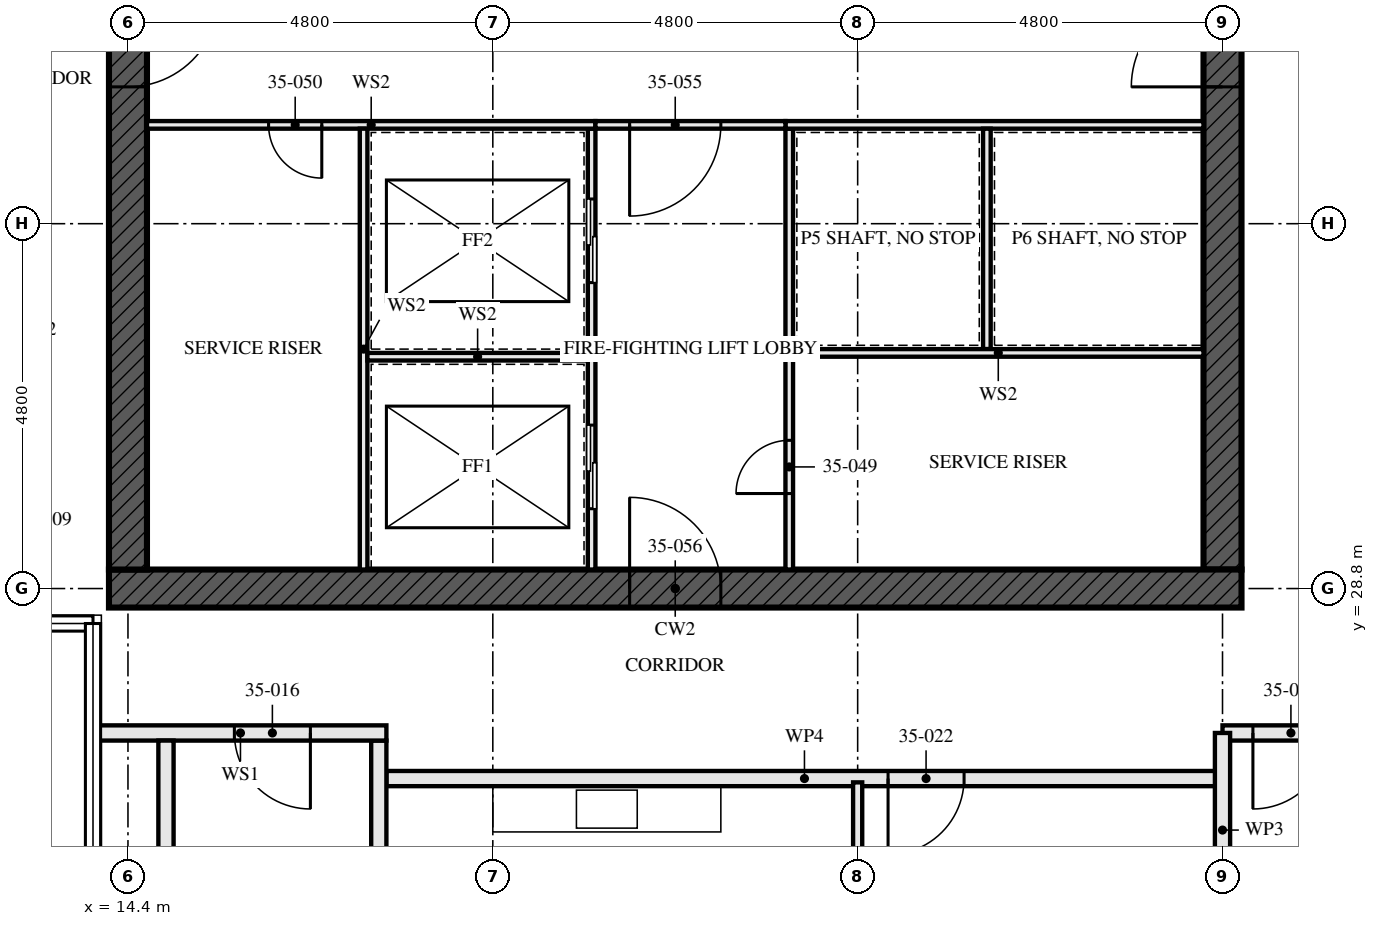
"""IFC4 building model, lengths in metres.
Left out: names, types, materials, properties, quantities, classifications, styles, units other than length and angle.
Written with IfcOpenShell. Run it as: python <this file> out.ifc"""

import sys

from ifc_helpers import new_model, si_unit, direction, frame, frame_2d, origin, place, context, subcontext, project, spatial, rectangle, extrude, element, fill, save


model = new_model("IFC4")
c1 = context("Model", 3, precision=1e-05, world=origin(), true_north=direction((0.0, 1.0)))
c2 = subcontext(c1, "Body", "Model", "MODEL_VIEW")
j1 = project(units=[si_unit("LENGTHUNIT", "METRE"), si_unit("PLANEANGLEUNIT", "RADIAN")], contexts=[c1])
p1 = place(None, origin())
s1 = spatial("IfcSite", under=j1, at=p1, CompositionType="ELEMENT")
p2 = place(p1, origin())
s2 = spatial("IfcBuilding", under=s1, at=p2, CompositionType="ELEMENT")
p3 = place(p2, frame((0.0, 0.0, 129.5)))
s3 = spatial("IfcBuildingStorey", under=s2, at=p3, CompositionType="ELEMENT", Elevation=129.5)
p4 = place(p3, frame((14.15, 28.8, -0.17), z_axis=(0.0, 0.0, 1.0), x_axis=(1.0, 0.0, 0.0)))
e1 = element("IfcWall", 1, at=p4, inside=s3, PredefinedType="SHEAR", context=c2, shape_type="SweptSolid", body=[
    extrude(rectangle(XDim=14.9, YDim=0.5, at=frame_2d((7.45, 0.0))), origin(), (0.0, 0.0, 1.0), 3.5),
])
p5 = place(p4, frame((6.85, 0.0, 0.17)))
e2 = element("IfcOpeningElement", 2, at=p5, cuts=e1, PredefinedType="OPENING", context=c2, shape_type="SweptSolid", body=[
    extrude(rectangle(XDim=1.2, YDim=2.1, at=frame_2d((0.6, 1.05))), frame((0.0, 0.26, 0.0), z_axis=(0.0, -1.0, 0.0), x_axis=(1.0, 0.0, 0.0)), (0.0, 0.0, 1.0), 0.521),
])
p6 = place(p3, frame((14.4, 42.95, -0.17), z_axis=(0.0, 0.0, 1.0), x_axis=(0.0, -1.0, 0.0)))
e3 = element("IfcWall", 3, at=p6, inside=s3, PredefinedType="SHEAR", context=c2, shape_type="SweptSolid", body=[
    extrude(rectangle(XDim=13.9, YDim=0.5, at=frame_2d((6.95, 0.0))), origin(), (0.0, 0.0, 1.0), 3.5),
])
p7 = place(p6, frame((6.35, 0.0, 0.17)))
e4 = element("IfcOpeningElement", 4, at=p7, cuts=e3, PredefinedType="OPENING", context=c2, shape_type="SweptSolid", body=[
    extrude(rectangle(XDim=1.2, YDim=2.1, at=frame_2d((0.6, 1.05))), frame((0.0, 0.26, 0.0), z_axis=(0.0, -1.0, 0.0), x_axis=(1.0, 0.0, 0.0)), (0.0, 0.0, 1.0), 0.521),
])
p8 = place(p3, frame((28.8, 29.05, -0.17), z_axis=(0.0, 0.0, 1.0), x_axis=(0.0, 1.0, 0.0)))
e5 = element("IfcWall", 5, at=p8, inside=s3, PredefinedType="SHEAR", context=c2, shape_type="SweptSolid", body=[
    extrude(rectangle(XDim=13.9, YDim=0.5, at=frame_2d((6.95, 0.0))), origin(), (0.0, 0.0, 1.0), 3.5),
])
p9 = place(p8, frame((6.35, 0.0, 0.17)))
e6 = element("IfcOpeningElement", 6, at=p9, cuts=e5, PredefinedType="OPENING", context=c2, shape_type="SweptSolid", body=[
    extrude(rectangle(XDim=1.2, YDim=2.1, at=frame_2d((0.6, 1.05))), frame((0.0, 0.26, 0.0), z_axis=(0.0, -1.0, 0.0), x_axis=(1.0, 0.0, 0.0)), (0.0, 0.0, 1.0), 0.521),
])
for number, where, z_axis, x_axis in (
    (7, (14.9, 22.1, 0.0), (0.0, 0.0, 1.0), (0.0, 1.0, 0.0)),
    (8, (17.7, 22.1, 0.0), (0.0, 0.0, 1.0), (0.0, 1.0, 0.0)),
):
    element("IfcWall", number, at=place(p3, frame(where, z_axis=z_axis, x_axis=x_axis)), inside=s3, PredefinedType="SOLIDWALL", context=c2, shape_type="SweptSolid", body=[
        extrude(rectangle(XDim=4.7, YDim=0.2, at=frame_2d((2.35, 0.0))), origin(), (0.0, 0.0, 1.0), 2.99),
    ])
p10 = place(p3, frame((13.96, 26.9, 0.0), z_axis=(0.0, 0.0, 1.0), x_axis=(1.0, 0.0, 0.0)))
e9 = element("IfcWall", 9, at=p10, inside=s3, PredefinedType="SOLIDWALL", context=c2, shape_type="SweptSolid", body=[
    extrude(rectangle(XDim=3.84, YDim=0.2, at=frame_2d((1.92, 0.0))), origin(), (0.0, 0.0, 1.0), 2.32),
])
p11 = place(p10, frame((1.84, 0.0, 0.0)))
e10 = element("IfcOpeningElement", 10, at=p11, cuts=e9, PredefinedType="OPENING", context=c2, shape_type="SweptSolid", body=[
    extrude(rectangle(XDim=1.0, YDim=2.1, at=frame_2d((0.5, 1.05))), frame((0.0, 0.111, 0.0), z_axis=(0.0, -1.0, 0.0), x_axis=(1.0, 0.0, 0.0)), (0.0, 0.0, 1.0), 0.221),
])
p12 = place(p3, frame((24.0, 20.1, 0.0), z_axis=(0.0, 0.0, 1.0), x_axis=(0.0, 1.0, 0.0)))
e11 = element("IfcWall", 11, at=p12, inside=s3, PredefinedType="PARTITIONING", context=c2, shape_type="SweptSolid", body=[
    extrude(rectangle(XDim=6.15, YDim=0.12, at=frame_2d((3.075, 0.0))), origin(), (0.0, 0.0, 1.0), 2.55),
])
p13 = place(p12, frame((2.625, 0.0, 0.0)))
e12 = element("IfcOpeningElement", 12, at=p13, cuts=e11, PredefinedType="OPENING", context=c2, shape_type="SweptSolid", body=[
    extrude(rectangle(XDim=0.9, YDim=2.1, at=frame_2d((0.45, 1.05))), frame((0.0, 0.071, 0.0), z_axis=(0.0, -1.0, 0.0), x_axis=(1.0, 0.0, 0.0)), (0.0, 0.0, 1.0), 0.141),
])
p14 = place(p3, frame((17.8, 26.3, 0.0), z_axis=(0.0, 0.0, 1.0), x_axis=(1.0, 0.0, 0.0)))
e13 = element("IfcWall", 13, at=p14, inside=s3, PredefinedType="PARTITIONING", context=c2, shape_type="SweptSolid", body=[
    extrude(rectangle(XDim=11.0, YDim=0.2, at=frame_2d((5.5, 0.0))), origin(), (0.0, 0.0, 1.0), 2.55),
])
p15 = place(p14, frame((6.6, 0.0, 0.0)))
e14 = element("IfcOpeningElement", 14, at=p15, cuts=e13, PredefinedType="OPENING", context=c2, shape_type="SweptSolid", body=[
    extrude(rectangle(XDim=1.0, YDim=2.1, at=frame_2d((0.5, 1.05))), frame((0.0, 0.111, 0.0), z_axis=(0.0, -1.0, 0.0), x_axis=(1.0, 0.0, 0.0)), (0.0, 0.0, 1.0), 0.221),
])
p16 = place(p3, frame((28.8, 26.9, 0.0), z_axis=(0.0, 0.0, 1.0), x_axis=(1.0, 0.0, 0.0)))
e15 = element("IfcWall", 15, at=p16, inside=s3, PredefinedType="PARTITIONING", context=c2, shape_type="SweptSolid", body=[
    extrude(rectangle(XDim=9.6, YDim=0.2, at=frame_2d((4.8, 0.0))), origin(), (0.0, 0.0, 1.0), 3.33),
])
p17 = place(p16, frame((0.4, 0.0, 0.0)))
e16 = element("IfcOpeningElement", 16, at=p17, cuts=e15, PredefinedType="OPENING", context=c2, shape_type="SweptSolid", body=[
    extrude(rectangle(XDim=1.0, YDim=2.1, at=frame_2d((0.5, 1.05))), frame((0.0, 0.111, 0.0), z_axis=(0.0, -1.0, 0.0), x_axis=(1.0, 0.0, 0.0)), (0.0, 0.0, 1.0), 0.221),
])
p18 = place(p3, frame((20.5, 29.05, 0.0), z_axis=(0.0, 0.0, 1.0), x_axis=(0.0, 1.0, 0.0)))
e17 = element("IfcWall", 17, at=p18, inside=s3, PredefinedType="SOLIDWALL", context=c2, shape_type="SweptSolid", body=[
    extrude(rectangle(XDim=5.8, YDim=0.1, at=frame_2d((2.9, 0.0))), origin(), (0.0, 0.0, 1.0), 3.33),
])
p19 = place(p18, frame((0.8, 0.0, 0.0)))
e18 = element("IfcOpeningElement", 18, at=p19, cuts=e17, PredefinedType="OPENING", context=c2, shape_type="SweptSolid", body=[
    extrude(rectangle(XDim=1.1, YDim=2.3, at=frame_2d((0.55, 1.15))), frame((0.0, 0.061, 0.0), z_axis=(0.0, -1.0, 0.0), x_axis=(1.0, 0.0, 0.0)), (0.0, 0.0, 1.0), 0.121),
])
p20 = place(p18, frame((3.775, 0.0, 0.0)))
e19 = element("IfcOpeningElement", 19, at=p20, cuts=e17, PredefinedType="OPENING", context=c2, shape_type="SweptSolid", body=[
    extrude(rectangle(XDim=1.1, YDim=2.3, at=frame_2d((0.55, 1.15))), frame((0.0, 0.061, 0.0), z_axis=(0.0, -1.0, 0.0), x_axis=(1.0, 0.0, 0.0)), (0.0, 0.0, 1.0), 0.121),
])
p21 = place(p3, frame((23.1, 29.05, 0.0), z_axis=(0.0, 0.0, 1.0), x_axis=(0.0, 1.0, 0.0)))
e20 = element("IfcWall", 20, at=p21, inside=s3, PredefinedType="SOLIDWALL", context=c2, shape_type="SweptSolid", body=[
    extrude(rectangle(XDim=5.8, YDim=0.1, at=frame_2d((2.9, 0.0))), origin(), (0.0, 0.0, 1.0), 3.33),
])
p22 = place(p21, frame((1.0, 0.0, 0.0)))
e21 = element("IfcOpeningElement", 21, at=p22, cuts=e20, PredefinedType="OPENING", context=c2, shape_type="SweptSolid", body=[
    extrude(rectangle(XDim=0.7, YDim=2.1, at=frame_2d((0.35, 1.05))), frame((0.0, 0.061, 0.0), z_axis=(0.0, -1.0, 0.0), x_axis=(1.0, 0.0, 0.0)), (0.0, 0.0, 1.0), 0.121),
])
p23 = place(p3, frame((14.65, 34.9, 0.0), z_axis=(0.0, 0.0, 1.0), x_axis=(1.0, 0.0, 0.0)))
e22 = element("IfcWall", 22, at=p23, inside=s3, PredefinedType="SOLIDWALL", context=c2, shape_type="SweptSolid", body=[
    extrude(rectangle(XDim=5.9, YDim=0.1, at=frame_2d((2.95, 0.0))), origin(), (0.0, 0.0, 1.0), 3.33),
])
p24 = place(p23, frame((1.6, 0.0, 0.0)))
e23 = element("IfcOpeningElement", 23, at=p24, cuts=e22, PredefinedType="OPENING", context=c2, shape_type="SweptSolid", body=[
    extrude(rectangle(XDim=0.7, YDim=2.1, at=frame_2d((0.35, 1.05))), frame((0.0, 0.061, 0.0), z_axis=(0.0, -1.0, 0.0), x_axis=(1.0, 0.0, 0.0)), (0.0, 0.0, 1.0), 0.121),
])
p25 = place(p3, frame((23.05, 34.9, 0.0), z_axis=(0.0, 0.0, 1.0), x_axis=(1.0, 0.0, 0.0)))
e24 = element("IfcWall", 24, at=p25, inside=s3, PredefinedType="SOLIDWALL", context=c2, shape_type="SweptSolid", body=[
    extrude(rectangle(XDim=5.5, YDim=0.1, at=frame_2d((2.75, 0.0))), origin(), (0.0, 0.0, 1.0), 3.33),
])
p26 = place(p3, frame((20.55, 34.9, 0.0), z_axis=(0.0, 0.0, 1.0), x_axis=(1.0, 0.0, 0.0)))
e25 = element("IfcWall", 25, at=p26, inside=s3, PredefinedType="SOLIDWALL", context=c2, shape_type="SweptSolid", body=[
    extrude(rectangle(XDim=2.5, YDim=0.1, at=frame_2d((1.25, 0.0))), origin(), (0.0, 0.0, 1.0), 3.33),
])
p27 = place(p26, frame((0.45, 0.0, 0.0)))
e26 = element("IfcOpeningElement", 26, at=p27, cuts=e25, PredefinedType="OPENING", context=c2, shape_type="SweptSolid", body=[
    extrude(rectangle(XDim=1.2, YDim=2.1, at=frame_2d((0.6, 1.05))), frame((0.0, 0.061, 0.0), z_axis=(0.0, -1.0, 0.0), x_axis=(1.0, 0.0, 0.0)), (0.0, 0.0, 1.0), 0.121),
])
p28 = place(p3, frame((17.5, 29.05, 0.0), z_axis=(0.0, 0.0, 1.0), x_axis=(0.0, 1.0, 0.0)))
e27 = element("IfcWall", 27, at=p28, inside=s3, PredefinedType="SOLIDWALL", context=c2, shape_type="SweptSolid", body=[
    extrude(rectangle(XDim=5.8, YDim=0.1, at=frame_2d((2.9, 0.0))), origin(), (0.0, 0.0, 1.0), 3.33),
])
p29 = place(p3, frame((17.55, 31.85, 0.0), z_axis=(0.0, 0.0, 1.0), x_axis=(1.0, 0.0, 0.0)))
e28 = element("IfcWall", 28, at=p29, inside=s3, PredefinedType="SOLIDWALL", context=c2, shape_type="SweptSolid", body=[
    extrude(rectangle(XDim=2.9, YDim=0.1, at=frame_2d((1.45, 0.0))), origin(), (0.0, 0.0, 1.0), 3.33),
])
p30 = place(p3, frame((25.7, 31.95, 0.0), z_axis=(0.0, 0.0, 1.0), x_axis=(0.0, 1.0, 0.0)))
e29 = element("IfcWall", 29, at=p30, inside=s3, PredefinedType="SOLIDWALL", context=c2, shape_type="SweptSolid", body=[
    extrude(rectangle(XDim=2.9, YDim=0.1, at=frame_2d((1.45, 0.0))), origin(), (0.0, 0.0, 1.0), 3.33),
])
p31 = place(p3, frame((23.15, 31.9, 0.0), z_axis=(0.0, 0.0, 1.0), x_axis=(1.0, 0.0, 0.0)))
e30 = element("IfcWall", 30, at=p31, inside=s3, PredefinedType="SOLIDWALL", context=c2, shape_type="SweptSolid", body=[
    extrude(rectangle(XDim=5.4, YDim=0.1, at=frame_2d((2.7, 0.0))), origin(), (0.0, 0.0, 1.0), 3.33),
])
p32 = place(p3, frame((28.8, 24.345, 0.0), z_axis=(0.0, 0.0, 1.0), x_axis=(0.0, 1.0, 0.0)))
e31 = element("IfcWall", 31, at=p32, inside=s3, PredefinedType="PARTITIONING", context=c2, shape_type="SweptSolid", body=[
    extrude(rectangle(XDim=2.555, YDim=0.2, at=frame_2d((1.277, 0.0))), origin(), (0.0, 0.0, 1.0), 2.32),
])
p33 = place(p11, frame((1.0, 0.0, 0.0), z_axis=(0.0, 0.0, 1.0), x_axis=(-1.0, 0.0, 0.0)))
e32 = element("IfcDoor", 32, at=p33, inside=s3, OperationType="SINGLE_SWING_RIGHT", PredefinedType="DOOR", context=c2, shape_type="SweptSolid", body=[
    extrude(rectangle(XDim=1.0, YDim=2.1, at=frame_2d((0.5, 1.05))), frame((0.0, 0.032, 0.0), z_axis=(0.0, -1.0, 0.0), x_axis=(1.0, 0.0, 0.0)), (0.0, 0.0, 1.0), 0.064),
])
fill(e10, e32)
p34 = place(p15, frame((1.0, 0.0, 0.0), z_axis=(0.0, 0.0, 1.0), x_axis=(-1.0, 0.0, 0.0)))
e33 = element("IfcDoor", 33, at=p34, inside=s3, OperationType="SINGLE_SWING_LEFT", PredefinedType="DOOR", context=c2, shape_type="SweptSolid", body=[
    extrude(rectangle(XDim=1.0, YDim=2.1, at=frame_2d((0.5, 1.05))), frame((0.0, 0.027, 0.0), z_axis=(0.0, -1.0, 0.0), x_axis=(1.0, 0.0, 0.0)), (0.0, 0.0, 1.0), 0.054),
])
fill(e14, e33)
p35 = place(p17, frame((1.0, 0.0, 0.0), z_axis=(0.0, 0.0, 1.0), x_axis=(-1.0, 0.0, 0.0)))
e34 = element("IfcDoor", 34, at=p35, inside=s3, OperationType="SINGLE_SWING_LEFT", PredefinedType="DOOR", context=c2, shape_type="SweptSolid", body=[
    extrude(rectangle(XDim=1.0, YDim=2.1, at=frame_2d((0.5, 1.05))), frame((0.0, 0.027, 0.0), z_axis=(0.0, -1.0, 0.0), x_axis=(1.0, 0.0, 0.0)), (0.0, 0.0, 1.0), 0.054),
])
fill(e16, e34)
p36 = place(p19, origin())
e35 = element("IfcDoor", 35, at=p36, inside=s3, OperationType="SLIDING_TO_LEFT", PredefinedType="DOOR", context=c2, shape_type="SweptSolid", body=[
    extrude(rectangle(XDim=1.1, YDim=2.3, at=frame_2d((0.55, 1.15))), frame((0.0, 0.05, 0.0), z_axis=(0.0, -1.0, 0.0), x_axis=(1.0, 0.0, 0.0)), (0.0, 0.0, 1.0), 0.1),
])
fill(e18, e35)
p37 = place(p20, origin())
e36 = element("IfcDoor", 36, at=p37, inside=s3, OperationType="SLIDING_TO_LEFT", PredefinedType="DOOR", context=c2, shape_type="SweptSolid", body=[
    extrude(rectangle(XDim=1.1, YDim=2.3, at=frame_2d((0.55, 1.15))), frame((0.0, 0.05, 0.0), z_axis=(0.0, -1.0, 0.0), x_axis=(1.0, 0.0, 0.0)), (0.0, 0.0, 1.0), 0.1),
])
fill(e19, e36)
p38 = place(p22, origin())
e37 = element("IfcDoor", 37, at=p38, inside=s3, OperationType="SINGLE_SWING_RIGHT", PredefinedType="DOOR", context=c2, shape_type="SweptSolid", body=[
    extrude(rectangle(XDim=0.7, YDim=2.1, at=frame_2d((0.35, 1.05))), frame((0.0, 0.027, 0.0), z_axis=(0.0, -1.0, 0.0), x_axis=(1.0, 0.0, 0.0)), (0.0, 0.0, 1.0), 0.054),
])
fill(e21, e37)
p39 = place(p24, frame((0.7, 0.0, 0.0), z_axis=(0.0, 0.0, 1.0), x_axis=(-1.0, 0.0, 0.0)))
e38 = element("IfcDoor", 38, at=p39, inside=s3, OperationType="SINGLE_SWING_RIGHT", PredefinedType="DOOR", context=c2, shape_type="SweptSolid", body=[
    extrude(rectangle(XDim=0.7, YDim=2.1, at=frame_2d((0.35, 1.05))), frame((0.0, 0.027, 0.0), z_axis=(0.0, -1.0, 0.0), x_axis=(1.0, 0.0, 0.0)), (0.0, 0.0, 1.0), 0.054),
])
fill(e23, e38)
p40 = place(p27, frame((1.2, 0.0, 0.0), z_axis=(0.0, 0.0, 1.0), x_axis=(-1.0, 0.0, 0.0)))
e39 = element("IfcDoor", 39, at=p40, inside=s3, OperationType="SINGLE_SWING_LEFT", PredefinedType="DOOR", context=c2, shape_type="SweptSolid", body=[
    extrude(rectangle(XDim=1.2, YDim=2.1, at=frame_2d((0.6, 1.05))), frame((0.0, 0.027, 0.0), z_axis=(0.0, -1.0, 0.0), x_axis=(1.0, 0.0, 0.0)), (0.0, 0.0, 1.0), 0.054),
])
fill(e26, e39)
p41 = place(p5, origin())
e40 = element("IfcDoor", 40, at=p41, inside=s3, OperationType="SINGLE_SWING_LEFT", PredefinedType="DOOR", context=c2, shape_type="SweptSolid", body=[
    extrude(rectangle(XDim=1.2, YDim=2.1, at=frame_2d((0.6, 1.05))), frame((0.0, 0.027, 0.0), z_axis=(0.0, -1.0, 0.0), x_axis=(1.0, 0.0, 0.0)), (0.0, 0.0, 1.0), 0.054),
])
fill(e2, e40)
p42 = place(p7, origin())
e41 = element("IfcDoor", 41, at=p42, inside=s3, OperationType="SINGLE_SWING_LEFT", PredefinedType="DOOR", context=c2, shape_type="SweptSolid", body=[
    extrude(rectangle(XDim=1.2, YDim=2.1, at=frame_2d((0.6, 1.05))), frame((0.0, 0.027, 0.0), z_axis=(0.0, -1.0, 0.0), x_axis=(1.0, 0.0, 0.0)), (0.0, 0.0, 1.0), 0.054),
])
fill(e4, e41)
p43 = place(p9, origin())
e42 = element("IfcDoor", 42, at=p43, inside=s3, OperationType="SINGLE_SWING_LEFT", PredefinedType="DOOR", context=c2, shape_type="SweptSolid", body=[
    extrude(rectangle(XDim=1.2, YDim=2.1, at=frame_2d((0.6, 1.05))), frame((0.0, 0.027, 0.0), z_axis=(0.0, -1.0, 0.0), x_axis=(1.0, 0.0, 0.0)), (0.0, 0.0, 1.0), 0.054),
])
fill(e6, e42)
save(model, sys.argv[1])
